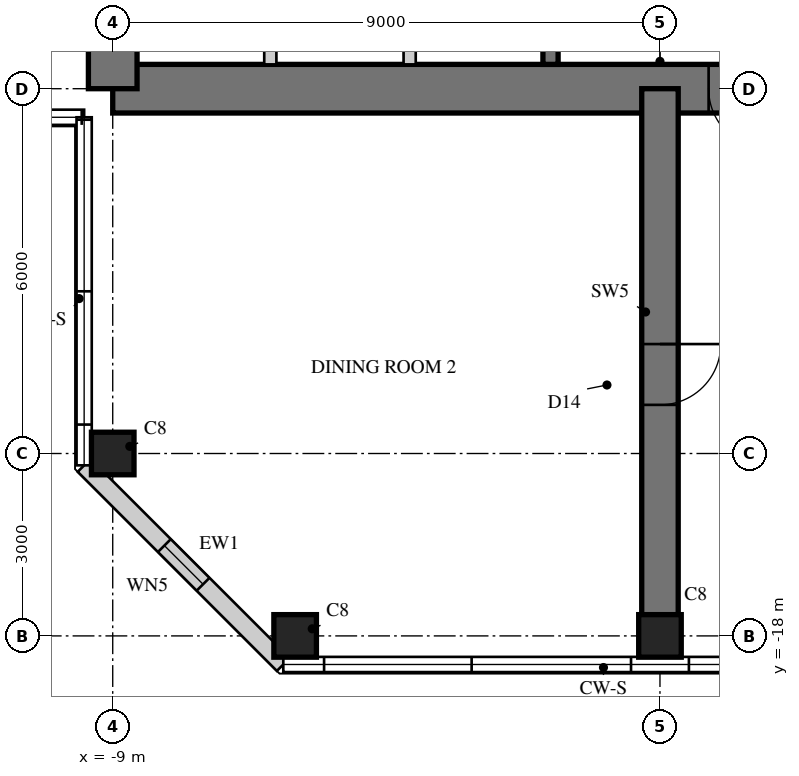
"""IFC4 building model, lengths in metres.
Left out: names, types, materials, properties, quantities, classifications, styles, units other than length and angle.
Written with IfcOpenShell. Run it as: python <this file> out.ifc"""

import sys

from ifc_helpers import new_model, si_unit, direction, frame, frame_2d, origin, origin_2d, place, context, subcontext, project, spatial, rectangle, hollow_rectangle, extrude, element, fill, save


model = new_model("IFC4")
c1 = context("Model", 3, precision=1e-05, world=origin(), true_north=direction((0.0, 1.0)))
c2 = subcontext(c1, "Body", "Model", "MODEL_VIEW")
j1 = project(units=[si_unit("LENGTHUNIT", "METRE"), si_unit("PLANEANGLEUNIT", "RADIAN")], contexts=[c1])
p1 = place(None, origin())
s1 = spatial("IfcSite", under=j1, at=p1, CompositionType="ELEMENT")
p2 = place(p1, origin())
s2 = spatial("IfcBuilding", under=s1, at=p2, CompositionType="ELEMENT")
p3 = place(p2, frame((0.0, 0.0, 288.3)))
s3 = spatial("IfcBuildingStorey", under=s2, at=p3, CompositionType="ELEMENT", Elevation=288.3)
p4 = place(p3, frame((-9.0, -9.0, 0.0), z_axis=(0.0, 0.0, 1.0), x_axis=(1.0, 0.0, 0.0)))
e1 = element("IfcWall", 1, at=p4, inside=s3, PredefinedType="SHEAR", context=c2, shape_type="SweptSolid", body=[
    extrude(rectangle(XDim=18.0, YDim=0.8, at=frame_2d((9.0, 0.0))), origin(), (0.0, 0.0, 1.0), 5.0),
])
p5 = place(p4, frame((9.8, 0.0, 0.0)))
e2 = element("IfcOpeningElement", 2, at=p5, cuts=e1, PredefinedType="OPENING", context=c2, shape_type="SweptSolid", body=[
    extrude(rectangle(XDim=1.0, YDim=2.4, at=frame_2d((0.5, 1.2))), frame((0.0, 0.41, 0.0), z_axis=(0.0, -1.0, 0.0), x_axis=(1.0, 0.0, 0.0)), (0.0, 0.0, 1.0), 0.82),
])
p6 = place(p3, frame((-9.0, 9.0, 0.0), z_axis=(0.0, 0.0, 1.0), x_axis=(0.0, -1.0, 0.0)))
e3 = element("IfcWall", 3, at=p6, inside=s3, PredefinedType="SHEAR", context=c2, shape_type="SweptSolid", body=[
    extrude(rectangle(XDim=18.0, YDim=0.8, at=frame_2d((9.0, 0.0))), origin(), (0.0, 0.0, 1.0), 5.0),
])
p7 = place(p6, frame((9.8, 0.0, 0.0)))
e4 = element("IfcOpeningElement", 4, at=p7, cuts=e3, PredefinedType="OPENING", context=c2, shape_type="SweptSolid", body=[
    extrude(rectangle(XDim=1.0, YDim=2.4, at=frame_2d((0.5, 1.2))), frame((0.0, 0.41, 0.0), z_axis=(0.0, -1.0, 0.0), x_axis=(1.0, 0.0, 0.0)), (0.0, 0.0, 1.0), 0.82),
])
p8 = place(p3, frame((-1.8, -1.875, 0.0), z_axis=(0.0, 0.0, 1.0), x_axis=(0.0, -1.0, 0.0)))
e5 = element("IfcWall", 5, at=p8, inside=s3, PredefinedType="SHEAR", context=c2, shape_type="SweptSolid", body=[
    extrude(rectangle(XDim=6.725, YDim=0.25, at=frame_2d((3.363, 0.0))), origin(), (0.0, 0.0, 1.0), 5.0),
])
p9 = place(p8, frame((1.875, 0.0, 0.0)))
e6 = element("IfcOpeningElement", 6, at=p9, cuts=e5, PredefinedType="OPENING", context=c2, shape_type="SweptSolid", body=[
    extrude(rectangle(XDim=1.6, YDim=2.4, at=frame_2d((0.8, 1.2))), frame((0.0, 0.135, 0.0), z_axis=(0.0, -1.0, 0.0), x_axis=(1.0, 0.0, 0.0)), (0.0, 0.0, 1.0), 0.27),
])
for number, where, z_axis, x_axis in (
    (7, (-4.117, -5.975, 0.0), (0.0, 0.0, 1.0), (0.0, -1.0, 0.0)),
    (8, (-6.408, -5.975, 0.0), (0.0, 0.0, 1.0), (0.0, -1.0, 0.0)),
):
    element("IfcWall", number, at=place(p3, frame(where, z_axis=z_axis, x_axis=x_axis)), inside=s3, PredefinedType="PARTITIONING", context=c2, shape_type="SweptSolid", body=[
        extrude(rectangle(XDim=2.625, YDim=0.2, at=frame_2d((1.312, 0.0))), origin(), (0.0, 0.0, 1.0), 5.0),
    ])
p10 = place(p3, frame((0.0, -9.0, 0.0), z_axis=(0.0, 0.0, 1.0), x_axis=(0.0, -1.0, 0.0)))
e9 = element("IfcWall", 9, at=p10, inside=s3, PredefinedType="SHEAR", context=c2, shape_type="SweptSolid", body=[
    extrude(rectangle(XDim=9.0, YDim=0.6, at=frame_2d((4.5, 0.0))), origin(), (0.0, 0.0, 1.0), 5.0),
])
p11 = place(p10, frame((4.2, 0.0, 0.0)))
e10 = element("IfcOpeningElement", 10, at=p11, cuts=e9, PredefinedType="OPENING", context=c2, shape_type="SweptSolid", body=[
    extrude(rectangle(XDim=1.0, YDim=2.2, at=frame_2d((0.5, 1.1))), frame((0.0, 0.31, 0.0), z_axis=(0.0, -1.0, 0.0), x_axis=(1.0, 0.0, 0.0)), (0.0, 0.0, 1.0), 0.62),
])
for number, where, z_axis, x_axis in (
    (11, (-9.0, -15.0, 0.0), (0.0, 0.0, 1.0), (1.0, 0.0, 0.0)),
    (12, (-6.0, -18.0, 0.0), (0.0, 0.0, 1.0), (1.0, 0.0, 0.0)),
    (13, (0.0, -18.0, 0.0), (0.0, 0.0, 1.0), (1.0, 0.0, 0.0)),
):
    element("IfcColumn", number, at=place(p3, frame(where, z_axis=z_axis, x_axis=x_axis)), inside=s3, PredefinedType="COLUMN", context=c2, shape_type="SweptSolid", body=[
        extrude(rectangle(XDim=0.7, YDim=0.7, at=origin_2d()), origin(), (0.0, 0.0, 1.0), 5.0),
    ])
p12 = place(p3, frame((-9.47, -15.195, 0.0), z_axis=(0.0, 0.0, 1.0), x_axis=(0.707106781187, -0.707106781187, 0.0)))
e14 = element("IfcWall", 14, at=p12, inside=s3, PredefinedType="SOLIDWALL", context=c2, shape_type="SweptSolid", body=[
    extrude(rectangle(XDim=4.632, YDim=0.3, at=frame_2d((2.316, 0.0))), origin(), (0.0, 0.0, 1.0), 4.75),
])
p13 = place(p12, frame((1.866, 0.0, 0.3)))
e15 = element("IfcOpeningElement", 15, at=p13, cuts=e14, PredefinedType="OPENING", context=c2, shape_type="SweptSolid", body=[
    extrude(rectangle(XDim=0.9, YDim=2.4, at=frame_2d((0.45, 1.2))), frame((0.0, 0.16, 0.0), z_axis=(0.0, -1.0, 0.0), x_axis=(1.0, 0.0, 0.0)), (0.0, 0.0, 1.0), 0.32),
])
p14 = place(p13, origin())
e16 = element("IfcWindow", 16, at=p14, inside=s3, PartitioningType="SINGLE_PANEL", PredefinedType="WINDOW", context=c2, shape_type="SweptSolid", body=[
    extrude(hollow_rectangle(XDim=0.9, YDim=2.4, WallThickness=0.06, at=frame_2d((0.45, 1.2))), frame((0.0, 0.03, 0.0), z_axis=(0.0, -1.0, 0.0), x_axis=(1.0, 0.0, 0.0)), (0.0, 0.0, 1.0), 0.06),
    extrude(rectangle(XDim=0.779, YDim=2.279, at=frame_2d((0.45, 1.2))), frame((0.0, 0.03, 0.0), z_axis=(0.0, -1.0, 0.0), x_axis=(1.0, 0.0, 0.0)), (0.0, 0.0, 1.0), 0.06),
])
fill(e15, e16)
p15 = place(p11, origin())
e17 = element("IfcDoor", 17, at=p15, inside=s3, OperationType="SINGLE_SWING_LEFT", PredefinedType="DOOR", context=c2, shape_type="SweptSolid", body=[
    extrude(rectangle(XDim=1.0, YDim=2.2, at=frame_2d((0.5, 1.1))), frame((0.0, 0.025, 0.0), z_axis=(0.0, -1.0, 0.0), x_axis=(1.0, 0.0, 0.0)), (0.0, 0.0, 1.0), 0.05),
])
fill(e10, e17)
p16 = place(p5, frame((1.0, 0.0, 0.0), z_axis=(0.0, 0.0, 1.0), x_axis=(-1.0, 0.0, 0.0)))
e18 = element("IfcDoor", 18, at=p16, inside=s3, OperationType="SINGLE_SWING_LEFT", PredefinedType="DOOR", context=c2, shape_type="SweptSolid", body=[
    extrude(rectangle(XDim=1.0, YDim=2.4, at=frame_2d((0.5, 1.2))), frame((0.0, -0.005, 0.0), z_axis=(0.0, -1.0, 0.0), x_axis=(1.0, 0.0, 0.0)), (0.0, 0.0, 1.0), 0.05),
])
fill(e2, e18)
save(model, sys.argv[1])
